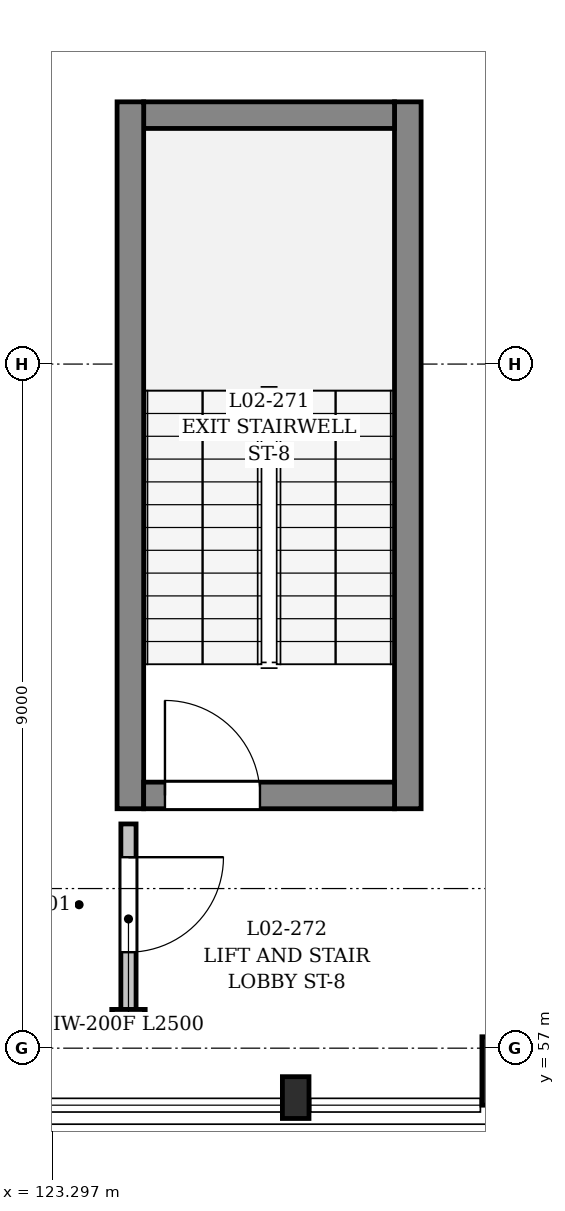
"""IFC4 building model, lengths in metres.
Left out: names, types, materials, properties, quantities, classifications, styles, units other than length and angle.
Written with IfcOpenShell. Run it as: python <this file> out.ifc"""

import sys

from ifc_helpers import new_model, si_unit, direction, frame, frame_2d, origin, origin_2d, place, context, subcontext, project, spatial, rectangle, extrude, element, fill, save


model = new_model("IFC4")
c1 = context("Model", 3, precision=1e-05, world=origin(), true_north=direction((0.0, 1.0)))
c2 = subcontext(c1, "Body", "Model", "MODEL_VIEW")
j1 = project(units=[si_unit("LENGTHUNIT", "METRE"), si_unit("PLANEANGLEUNIT", "RADIAN")], contexts=[c1])
p1 = place(None, origin())
s1 = spatial("IfcSite", under=j1, at=p1, CompositionType="ELEMENT")
p2 = place(p1, origin())
s2 = spatial("IfcBuilding", under=s1, at=p2, CompositionType="ELEMENT")
p3 = place(p2, frame((0.0, 0.0, 5.4)))
s3 = spatial("IfcBuildingStorey", under=s2, at=p3, CompositionType="ELEMENT", Elevation=5.4)
p4 = place(p3, frame((129.4, 56.7, 0.0), z_axis=(0.0, 0.0, 1.0), x_axis=(1.0, 0.0, 0.0)))
e1 = element("IfcColumn", 1, at=p4, inside=s3, PredefinedType="COLUMN", context=c2, shape_type="SweptSolid", body=[
    extrude(rectangle(XDim=0.9, YDim=0.9, at=origin_2d()), origin(), (0.0, 0.0, 1.0), 4.45),
])
p5 = place(p3, frame((126.5, 56.35, 0.0), z_axis=(0.0, 0.0, 1.0), x_axis=(1.0, 0.0, 0.0)))
e2 = element("IfcColumn", 2, at=p5, inside=s3, PredefinedType="PILASTER", context=c2, shape_type="SweptSolid", body=[
    extrude(rectangle(XDim=0.35, YDim=0.55, at=origin_2d()), origin(), (0.0, 0.0, 1.0), 4.45),
])
p6 = place(p3, frame((127.975, 60.15, 0.0), z_axis=(0.0, 0.0, 1.0), x_axis=(0.0, 1.0, 0.0)))
e3 = element("IfcWall", 3, at=p6, inside=s3, PredefinedType="SHEAR", context=c2, shape_type="SweptSolid", body=[
    extrude(rectangle(XDim=9.3, YDim=0.35, at=frame_2d((4.65, 0.0))), origin(), (0.0, 0.0, 1.0), 4.45),
])
p7 = place(p3, frame((127.8, 69.275, 0.0), z_axis=(0.0, 0.0, 1.0), x_axis=(-1.0, 0.0, 0.0)))
e4 = element("IfcWall", 4, at=p7, inside=s3, PredefinedType="SHEAR", context=c2, shape_type="SweptSolid", body=[
    extrude(rectangle(XDim=3.3, YDim=0.35, at=frame_2d((1.65, 0.0))), origin(), (0.0, 0.0, 1.0), 4.45),
])
p8 = place(p3, frame((124.325, 69.45, 0.0), z_axis=(0.0, 0.0, 1.0), x_axis=(0.0, -1.0, 0.0)))
e5 = element("IfcWall", 5, at=p8, inside=s3, PredefinedType="SHEAR", context=c2, shape_type="SweptSolid", body=[
    extrude(rectangle(XDim=9.3, YDim=0.35, at=frame_2d((4.65, 0.0))), origin(), (0.0, 0.0, 1.0), 4.45),
])
p9 = place(p3, frame((124.5, 60.325, 0.0), z_axis=(0.0, 0.0, 1.0), x_axis=(1.0, 0.0, 0.0)))
e6 = element("IfcWall", 6, at=p9, inside=s3, PredefinedType="SHEAR", context=c2, shape_type="SweptSolid", body=[
    extrude(rectangle(XDim=3.3, YDim=0.35, at=frame_2d((1.65, 0.0))), origin(), (0.0, 0.0, 1.0), 4.45),
])
p10 = place(p9, frame((0.28, 0.0, 0.0)))
e7 = element("IfcOpeningElement", 7, at=p10, cuts=e6, PredefinedType="OPENING", context=c2, shape_type="SweptSolid", body=[
    extrude(rectangle(XDim=1.25, YDim=2.2, at=frame_2d((0.625, 1.1))), frame((0.0, 0.185, 0.0), z_axis=(0.0, -1.0, 0.0), x_axis=(1.0, 0.0, 0.0)), (0.0, 0.0, 1.0), 0.37),
])
p11 = place(p3, frame((124.3, 59.95, 0.0), z_axis=(0.0, 0.0, 1.0), x_axis=(0.0, -1.0, 0.0)))
e8 = element("IfcWall", 8, at=p11, inside=s3, PredefinedType="PARTITIONING", context=c2, shape_type="SweptSolid", body=[
    extrude(rectangle(XDim=2.5, YDim=0.2, at=frame_2d((1.25, 0.0))), origin(), (0.0, 0.0, 1.0), 4.45),
])
p12 = place(p11, frame((0.438, 0.0, 0.0)))
e9 = element("IfcOpeningElement", 9, at=p12, cuts=e8, PredefinedType="OPENING", context=c2, shape_type="SweptSolid", body=[
    extrude(rectangle(XDim=1.25, YDim=2.2, at=frame_2d((0.625, 1.1))), frame((0.0, 0.11, 0.0), z_axis=(0.0, -1.0, 0.0), x_axis=(1.0, 0.0, 0.0)), (0.0, 0.0, 1.0), 0.22),
])
p13 = place(p3, frame((124.08, 57.45, 0.0), z_axis=(0.0, 0.0, 1.0), x_axis=(1.0, 0.0, 0.0)))
e10 = element("IfcWall", 10, at=p13, inside=s3, PredefinedType="PARTITIONING", context=c2, shape_type="SweptSolid", body=[
    extrude(rectangle(XDim=0.44, YDim=0.12, at=frame_2d((0.22, 0.0))), origin(), (0.0, 0.0, 1.0), 4.45),
])
p14 = place(p10, origin())
e11 = element("IfcDoor", 11, at=p14, inside=s3, OperationType="SINGLE_SWING_LEFT", PredefinedType="DOOR", context=c2, shape_type="SweptSolid", body=[
    extrude(rectangle(XDim=1.25, YDim=2.2, at=frame_2d((0.625, 1.1))), frame((0.0, 0.025, 0.0), z_axis=(0.0, -1.0, 0.0), x_axis=(1.0, 0.0, 0.0)), (0.0, 0.0, 1.0), 0.05),
])
fill(e7, e11)
p15 = place(p12, origin())
e12 = element("IfcDoor", 12, at=p15, inside=s3, OperationType="SINGLE_SWING_LEFT", PredefinedType="DOOR", context=c2, shape_type="SweptSolid", body=[
    extrude(rectangle(XDim=1.25, YDim=2.2, at=frame_2d((0.625, 1.1))), frame((0.0, 0.025, 0.0), z_axis=(0.0, -1.0, 0.0), x_axis=(1.0, 0.0, 0.0)), (0.0, 0.0, 1.0), 0.05),
])
fill(e9, e12)
save(model, sys.argv[1])
